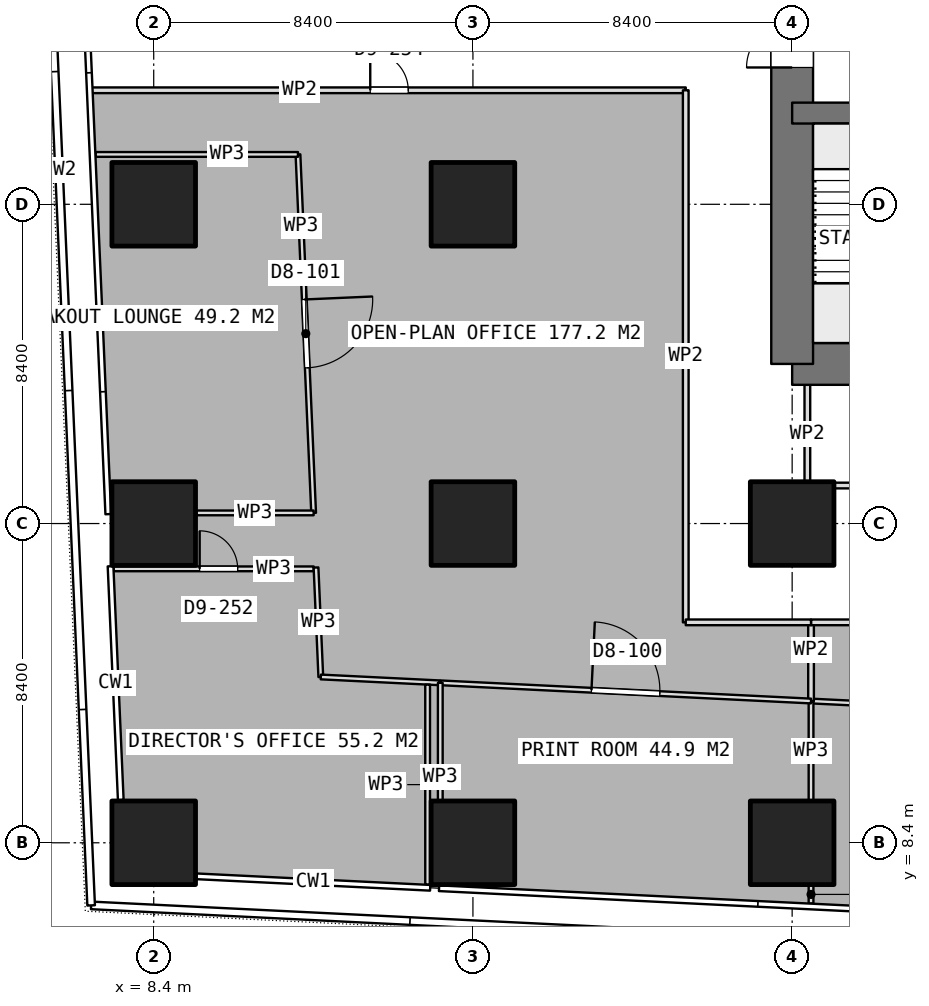
"""IFC4 building model, lengths in metres.
Left out: names, types, materials, properties, quantities, classifications, styles, units other than length and angle.
Written with IfcOpenShell. Run it as: python <this file> out.ifc"""

import sys

from ifc_helpers import new_model, si_unit, direction, frame, frame_2d, origin, origin_2d, place, context, subcontext, project, spatial, rectangle, extrude, element, fill, save


model = new_model("IFC4")
c1 = context("Model", 3, precision=1e-05, world=origin(), true_north=direction((0.0, 1.0)))
c2 = subcontext(c1, "Body", "Model", "MODEL_VIEW")
j1 = project(units=[si_unit("LENGTHUNIT", "METRE"), si_unit("PLANEANGLEUNIT", "RADIAN")], contexts=[c1])
p1 = place(None, origin())
s1 = spatial("IfcSite", under=j1, at=p1, CompositionType="ELEMENT")
p2 = place(p1, origin())
s2 = spatial("IfcBuilding", under=s1, at=p2, CompositionType="ELEMENT")
p3 = place(p2, frame((0.0, 0.0, 74.15)))
s3 = spatial("IfcBuildingStorey", under=s2, at=p3, CompositionType="ELEMENT", Elevation=74.15)
p4 = place(p3, frame((25.2, 21.0, 0.0), z_axis=(0.0, 0.0, 1.0), x_axis=(1.0, 0.0, 0.0)))
e1 = element("IfcWall", 1, at=p4, inside=s3, PredefinedType="SHEAR", context=c2, shape_type="SweptSolid", body=[
    extrude(rectangle(XDim=10.4, YDim=1.1, at=frame_2d((5.2, 0.0))), origin(), (0.0, 0.0, 1.0), 3.75),
])
p5 = place(p3, frame((25.2, 21.0, 0.0), z_axis=(0.0, 0.0, 1.0), x_axis=(0.0, 1.0, 0.0)))
e2 = element("IfcWall", 2, at=p5, inside=s3, PredefinedType="SHEAR", context=c2, shape_type="SweptSolid", body=[
    extrude(rectangle(XDim=25.2, YDim=1.1, at=frame_2d((12.6, 0.0))), origin(), (0.0, 0.0, 1.0), 3.75),
])
p6 = place(p5, frame((7.8, 0.0, 0.0)))
e3 = element("IfcOpeningElement", 3, at=p6, cuts=e2, PredefinedType="OPENING", context=c2, shape_type="SweptSolid", body=[
    extrude(rectangle(XDim=1.2, YDim=2.1, at=frame_2d((0.6, 1.05))), frame((0.0, 0.56, 0.0), z_axis=(0.0, -1.0, 0.0), x_axis=(1.0, 0.0, 0.0)), (0.0, 0.0, 1.0), 1.12),
])
p7 = place(p5, frame((14.25, 0.0, 0.0)))
e4 = element("IfcOpeningElement", 4, at=p7, cuts=e2, PredefinedType="OPENING", context=c2, shape_type="SweptSolid", body=[
    extrude(rectangle(XDim=0.9, YDim=2.1, at=frame_2d((0.45, 1.05))), frame((0.0, 0.56, 0.0), z_axis=(0.0, -1.0, 0.0), x_axis=(1.0, 0.0, 0.0)), (0.0, 0.0, 1.0), 1.12),
])
p8 = place(p5, frame((16.85, 0.0, 0.0)))
e5 = element("IfcOpeningElement", 5, at=p8, cuts=e2, PredefinedType="OPENING", context=c2, shape_type="SweptSolid", body=[
    extrude(rectangle(XDim=0.9, YDim=2.1, at=frame_2d((0.45, 1.05))), frame((0.0, 0.56, 0.0), z_axis=(0.0, -1.0, 0.0), x_axis=(1.0, 0.0, 0.0)), (0.0, 0.0, 1.0), 1.12),
])
p9 = place(p5, frame((19.075, 0.0, 0.0)))
e6 = element("IfcOpeningElement", 6, at=p9, cuts=e2, PredefinedType="OPENING", context=c2, shape_type="SweptSolid", body=[
    extrude(rectangle(XDim=1.2, YDim=2.1, at=frame_2d((0.6, 1.05))), frame((0.0, 0.56, 0.0), z_axis=(0.0, -1.0, 0.0), x_axis=(1.0, 0.0, 0.0)), (0.0, 0.0, 1.0), 1.12),
])
p10 = place(p3, frame((25.2, 27.6, 0.0), z_axis=(0.0, 0.0, 1.0), x_axis=(1.0, 0.0, 0.0)))
e7 = element("IfcWall", 7, at=p10, inside=s3, PredefinedType="SHEAR", context=c2, shape_type="SweptSolid", body=[
    extrude(rectangle(XDim=6.6, YDim=0.55, at=frame_2d((3.3, 0.0))), origin(), (0.0, 0.0, 1.0), 3.75),
])
p11 = place(p10, frame((4.925, 0.0, 0.0)))
e8 = element("IfcOpeningElement", 8, at=p11, cuts=e7, PredefinedType="OPENING", context=c2, shape_type="SweptSolid", body=[
    extrude(rectangle(XDim=1.2, YDim=2.1, at=frame_2d((0.6, 1.05))), frame((0.0, 0.285, 0.0), z_axis=(0.0, -1.0, 0.0), x_axis=(1.0, 0.0, 0.0)), (0.0, 0.0, 1.0), 0.57),
])
for number, where, z_axis, x_axis in (
    (9, (8.4, 8.4, 0.0), (0.0, 0.0, 1.0), (1.0, 0.0, 0.0)),
    (10, (8.4, 16.8, 0.0), (0.0, 0.0, 1.0), (1.0, 0.0, 0.0)),
    (11, (8.4, 25.2, 0.0), (0.0, 0.0, 1.0), (1.0, 0.0, 0.0)),
    (12, (16.8, 8.4, 0.0), (0.0, 0.0, 1.0), (1.0, 0.0, 0.0)),
    (13, (16.8, 16.8, 0.0), (0.0, 0.0, 1.0), (1.0, 0.0, 0.0)),
    (14, (16.8, 25.2, 0.0), (0.0, 0.0, 1.0), (1.0, 0.0, 0.0)),
    (15, (25.2, 8.4, 0.0), (0.0, 0.0, 1.0), (1.0, 0.0, 0.0)),
    (16, (25.2, 16.8, 0.0), (0.0, 0.0, 1.0), (1.0, 0.0, 0.0)),
):
    element("IfcColumn", number, at=place(p3, frame(where, z_axis=z_axis, x_axis=x_axis)), inside=s3, PredefinedType="COLUMN", context=c2, shape_type="SweptSolid", body=[
        extrude(rectangle(XDim=2.2, YDim=2.2, at=origin_2d()), origin(), (0.0, 0.0, 1.0), 3.75),
    ])
p12 = place(p3, frame((25.525, 17.8, 0.0), z_axis=(0.0, 0.0, 1.0), x_axis=(1.0, 0.0, 0.0)))
e17 = element("IfcWall", 17, at=p12, inside=s3, PredefinedType="PARTITIONING", context=c2, shape_type="SweptSolid", body=[
    extrude(rectangle(XDim=9.75, YDim=0.15, at=frame_2d((4.875, 0.0))), origin(), (0.0, 0.0, 1.0), 3.5),
])
p13 = place(p12, frame((4.375, 0.0, 0.0)))
e18 = element("IfcOpeningElement", 18, at=p13, cuts=e17, PredefinedType="OPENING", context=c2, shape_type="SweptSolid", body=[
    extrude(rectangle(XDim=1.0, YDim=2.1, at=frame_2d((0.5, 1.05))), frame((0.0, 0.085, 0.0), z_axis=(0.0, -1.0, 0.0), x_axis=(1.0, 0.0, 0.0)), (0.0, 0.0, 1.0), 0.17),
])
p14 = place(p3, frame((25.6, 17.875, 0.0), z_axis=(0.0, 0.0, 1.0), x_axis=(0.0, 1.0, 0.0)))
e19 = element("IfcWall", 19, at=p14, inside=s3, PredefinedType="PARTITIONING", context=c2, shape_type="SweptSolid", body=[
    extrude(rectangle(XDim=2.575, YDim=0.15, at=frame_2d((1.288, 0.0))), origin(), (0.0, 0.0, 1.0), 3.5),
])
p15 = place(p3, frame((25.697, 12.13, 0.0), z_axis=(0.0, 0.0, 1.0), x_axis=(0.99879453849, -0.049086351277, 0.0)))
e20 = element("IfcWall", 20, at=p15, inside=s3, PredefinedType="PARTITIONING", context=c2, shape_type="SweptSolid", body=[
    extrude(rectangle(XDim=10.614, YDim=0.125, at=frame_2d((5.307, 0.0))), origin(), (0.0, 0.0, 1.0), 3.5),
])
p16 = place(p15, frame((4.407, 0.0, 0.0)))
e21 = element("IfcOpeningElement", 21, at=p16, cuts=e20, PredefinedType="OPENING", context=c2, shape_type="SweptSolid", body=[
    extrude(rectangle(XDim=1.8, YDim=2.1, at=frame_2d((0.9, 1.05))), frame((0.0, 0.073, 0.0), z_axis=(0.0, -1.0, 0.0), x_axis=(1.0, 0.0, 0.0)), (0.0, 0.0, 1.0), 0.145),
])
p17 = place(p3, frame((25.697, 6.803, 0.0), z_axis=(0.0, 0.0, 1.0), x_axis=(0.0, 1.0, 0.0)))
e22 = element("IfcWall", 22, at=p17, inside=s3, PredefinedType="PARTITIONING", context=c2, shape_type="SweptSolid", body=[
    extrude(rectangle(XDim=0.477, YDim=0.125, at=frame_2d((0.239, 0.0))), origin(), (0.0, 0.0, 1.0), 3.5),
])
p18 = place(p3, frame((25.697, 9.52, 0.0), z_axis=(0.0, 0.0, 1.0), x_axis=(0.0, 1.0, 0.0)))
e23 = element("IfcWall", 23, at=p18, inside=s3, PredefinedType="PARTITIONING", context=c2, shape_type="SweptSolid", body=[
    extrude(rectangle(XDim=2.61, YDim=0.125, at=frame_2d((1.305, 0.0))), origin(), (0.0, 0.0, 1.0), 3.5),
])
p19 = place(p3, frame((25.697, 12.13, 0.0), z_axis=(0.0, 0.0, 1.0), x_axis=(0.0, 1.0, 0.0)))
e24 = element("IfcWall", 24, at=p19, inside=s3, PredefinedType="PARTITIONING", context=c2, shape_type="SweptSolid", body=[
    extrude(rectangle(XDim=2.07, YDim=0.15, at=frame_2d((1.035, 0.0))), origin(), (0.0, 0.0, 1.0), 3.5),
])
p20 = place(p3, frame((25.697, 14.2, 0.0), z_axis=(0.0, 0.0, 1.0), x_axis=(1.0, 0.0, 0.0)))
e25 = element("IfcWall", 25, at=p20, inside=s3, PredefinedType="PARTITIONING", context=c2, shape_type="SweptSolid", body=[
    extrude(rectangle(XDim=10.603, YDim=0.15, at=frame_2d((5.302, 0.0))), origin(), (0.0, 0.0, 1.0), 3.5),
])
p21 = place(p3, frame((12.196, 26.512, 0.0), z_axis=(0.0, 0.0, 1.0), x_axis=(0.043625757269, -0.999047943445, 0.0)))
e26 = element("IfcWall", 26, at=p21, inside=s3, PredefinedType="PARTITIONING", context=c2, shape_type="SweptSolid", body=[
    extrude(rectangle(XDim=9.441, YDim=0.125, at=frame_2d((4.72, 0.0))), origin(), (0.0, 0.0, 1.0), 3.5),
])
p22 = place(p21, frame((3.82, 0.0, 0.0)))
e27 = element("IfcOpeningElement", 27, at=p22, cuts=e26, PredefinedType="OPENING", context=c2, shape_type="SweptSolid", body=[
    extrude(rectangle(XDim=1.8, YDim=2.1, at=frame_2d((0.9, 1.05))), frame((0.0, 0.073, 0.0), z_axis=(0.0, -1.0, 0.0), x_axis=(1.0, 0.0, 0.0)), (0.0, 0.0, 1.0), 0.145),
])
p23 = place(p3, frame((12.608, 17.08, 0.0), z_axis=(0.0, 0.0, 1.0), x_axis=(-1.0, 0.0, 0.0)))
e28 = element("IfcWall", 28, at=p23, inside=s3, PredefinedType="PARTITIONING", context=c2, shape_type="SweptSolid", body=[
    extrude(rectangle(XDim=3.088, YDim=0.125, at=frame_2d((1.544, 0.0))), origin(), (0.0, 0.0, 1.0), 3.5),
])
p24 = place(p3, frame((6.871, 26.512, 0.0), z_axis=(0.0, 0.0, 1.0), x_axis=(1.0, 0.0, 0.0)))
e29 = element("IfcWall", 29, at=p24, inside=s3, PredefinedType="PARTITIONING", context=c2, shape_type="SweptSolid", body=[
    extrude(rectangle(XDim=5.325, YDim=0.125, at=frame_2d((2.663, 0.0))), origin(), (0.0, 0.0, 1.0), 3.5),
])
p25 = place(p3, frame((7.347, 15.608, 0.0), z_axis=(0.0, 0.0, 1.0), x_axis=(1.0, 0.0, 0.0)))
e30 = element("IfcWall", 30, at=p25, inside=s3, PredefinedType="PARTITIONING", context=c2, shape_type="SweptSolid", body=[
    extrude(rectangle(XDim=5.263, YDim=0.125, at=frame_2d((2.632, 0.0))), origin(), (0.0, 0.0, 1.0), 3.5),
])
p26 = place(p25, frame((2.262, 0.0, 0.0)))
e31 = element("IfcOpeningElement", 31, at=p26, cuts=e30, PredefinedType="OPENING", context=c2, shape_type="SweptSolid", body=[
    extrude(rectangle(XDim=1.0, YDim=2.1, at=frame_2d((0.5, 1.05))), frame((0.0, 0.073, 0.0), z_axis=(0.0, -1.0, 0.0), x_axis=(1.0, 0.0, 0.0)), (0.0, 0.0, 1.0), 0.145),
])
p27 = place(p3, frame((12.671, 15.643, 0.0), z_axis=(0.0, 0.0, 1.0), x_axis=(0.043782676762, -0.999041078843, 0.0)))
e32 = element("IfcWall", 32, at=p27, inside=s3, PredefinedType="PARTITIONING", context=c2, shape_type="SweptSolid", body=[
    extrude(rectangle(XDim=2.883, YDim=0.125, at=frame_2d((1.441, 0.0))), origin(), (0.0, 0.0, 1.0), 3.5),
])
p28 = place(p3, frame((12.797, 12.763, 0.0), z_axis=(0.0, 0.0, 1.0), x_axis=(0.998790140287, -0.049175762993, 0.0)))
e33 = element("IfcWall", 33, at=p28, inside=s3, PredefinedType="PARTITIONING", context=c2, shape_type="SweptSolid", body=[
    extrude(rectangle(XDim=3.133, YDim=0.125, at=frame_2d((1.566, 0.0))), origin(), (0.0, 0.0, 1.0), 3.5),
])
p29 = place(p3, frame((15.608, 12.562, 0.0), z_axis=(0.0, 0.0, 1.0), x_axis=(0.0, -1.0, 0.0)))
e34 = element("IfcWall", 34, at=p29, inside=s3, PredefinedType="PARTITIONING", context=c2, shape_type="SweptSolid", body=[
    extrude(rectangle(XDim=5.263, YDim=0.125, at=frame_2d((2.631, 0.0))), origin(), (0.0, 0.0, 1.0), 3.5),
])
p30 = place(p3, frame((15.941, 12.609, 0.0), z_axis=(0.0, 0.0, 1.0), x_axis=(0.998796633854, -0.049043696865, 0.0)))
e35 = element("IfcWall", 35, at=p30, inside=s3, PredefinedType="PARTITIONING", context=c2, shape_type="SweptSolid", body=[
    extrude(rectangle(XDim=9.767, YDim=0.125, at=frame_2d((4.883, 0.0))), origin(), (0.0, 0.0, 1.0), 3.5),
])
p31 = place(p30, frame((3.983, 0.0, 0.0)))
e36 = element("IfcOpeningElement", 36, at=p31, cuts=e35, PredefinedType="OPENING", context=c2, shape_type="SweptSolid", body=[
    extrude(rectangle(XDim=1.8, YDim=2.1, at=frame_2d((0.9, 1.05))), frame((0.0, 0.073, 0.0), z_axis=(0.0, -1.0, 0.0), x_axis=(1.0, 0.0, 0.0)), (0.0, 0.0, 1.0), 0.145),
])
p32 = place(p3, frame((15.941, 9.52, 0.0), z_axis=(0.0, 0.0, 1.0), x_axis=(0.0, 1.0, 0.0)))
e37 = element("IfcWall", 37, at=p32, inside=s3, PredefinedType="PARTITIONING", context=c2, shape_type="SweptSolid", body=[
    extrude(rectangle(XDim=3.089, YDim=0.125, at=frame_2d((1.544, 0.0))), origin(), (0.0, 0.0, 1.0), 3.5),
])
p33 = place(p3, frame((6.767, 28.2, 0.0), z_axis=(0.0, 0.0, 1.0), x_axis=(1.0, 0.0, 0.0)))
e38 = element("IfcWall", 38, at=p33, inside=s3, PredefinedType="PARTITIONING", context=c2, shape_type="SweptSolid", body=[
    extrude(rectangle(XDim=15.633, YDim=0.15, at=frame_2d((7.816, 0.0))), origin(), (0.0, 0.0, 1.0), 3.5),
])
p34 = place(p33, frame((7.331, 0.0, 0.0)))
e39 = element("IfcOpeningElement", 39, at=p34, cuts=e38, PredefinedType="OPENING", context=c2, shape_type="SweptSolid", body=[
    extrude(rectangle(XDim=1.0, YDim=2.1, at=frame_2d((0.5, 1.05))), frame((0.0, 0.085, 0.0), z_axis=(0.0, -1.0, 0.0), x_axis=(1.0, 0.0, 0.0)), (0.0, 0.0, 1.0), 0.17),
])
p35 = place(p3, frame((22.4, 28.2, 0.0), z_axis=(0.0, 0.0, 1.0), x_axis=(0.0, -1.0, 0.0)))
e40 = element("IfcWall", 40, at=p35, inside=s3, PredefinedType="PARTITIONING", context=c2, shape_type="SweptSolid", body=[
    extrude(rectangle(XDim=14.0, YDim=0.15, at=frame_2d((7.0, 0.0))), origin(), (0.0, 0.0, 1.0), 3.5),
])
p36 = place(p3, frame((22.4, 14.2, 0.0), z_axis=(0.0, 0.0, 1.0), x_axis=(1.0, 0.0, 0.0)))
e41 = element("IfcWall", 41, at=p36, inside=s3, PredefinedType="PARTITIONING", context=c2, shape_type="SweptSolid", body=[
    extrude(rectangle(XDim=3.296, YDim=0.15, at=frame_2d((1.648, 0.0))), origin(), (0.0, 0.0, 1.0), 3.5),
])
p37 = place(p6, origin())
e42 = element("IfcDoor", 42, at=p37, inside=s3, OperationType="SINGLE_SWING_LEFT", PredefinedType="DOOR", context=c2, shape_type="SweptSolid", body=[
    extrude(rectangle(XDim=1.2, YDim=2.1, at=frame_2d((0.6, 1.05))), frame((0.0, 0.025, 0.0), z_axis=(0.0, -1.0, 0.0), x_axis=(1.0, 0.0, 0.0)), (0.0, 0.0, 1.0), 0.05),
])
fill(e3, e42)
p38 = place(p22, origin())
e43 = element("IfcDoor", 43, at=p38, inside=s3, OperationType="DOUBLE_DOOR_SINGLE_SWING", PredefinedType="DOOR", context=c2, shape_type="SweptSolid", body=[
    extrude(rectangle(XDim=1.8, YDim=2.1, at=frame_2d((0.9, 1.05))), frame((0.0, 0.025, 0.0), z_axis=(0.0, -1.0, 0.0), x_axis=(1.0, 0.0, 0.0)), (0.0, 0.0, 1.0), 0.05),
])
fill(e27, e43)
p39 = place(p26, origin())
e44 = element("IfcDoor", 44, at=p39, inside=s3, OperationType="SINGLE_SWING_LEFT", PredefinedType="DOOR", context=c2, shape_type="SweptSolid", body=[
    extrude(rectangle(XDim=1.0, YDim=2.1, at=frame_2d((0.5, 1.05))), frame((0.0, 0.025, 0.0), z_axis=(0.0, -1.0, 0.0), x_axis=(1.0, 0.0, 0.0)), (0.0, 0.0, 1.0), 0.05),
])
fill(e31, e44)
p40 = place(p31, origin())
e45 = element("IfcDoor", 45, at=p40, inside=s3, OperationType="DOUBLE_DOOR_SINGLE_SWING", PredefinedType="DOOR", context=c2, shape_type="SweptSolid", body=[
    extrude(rectangle(XDim=1.8, YDim=2.1, at=frame_2d((0.9, 1.05))), frame((0.0, 0.025, 0.0), z_axis=(0.0, -1.0, 0.0), x_axis=(1.0, 0.0, 0.0)), (0.0, 0.0, 1.0), 0.05),
])
fill(e36, e45)
p41 = place(p34, origin())
e46 = element("IfcDoor", 46, at=p41, inside=s3, OperationType="SINGLE_SWING_LEFT", PredefinedType="DOOR", context=c2, shape_type="SweptSolid", body=[
    extrude(rectangle(XDim=1.0, YDim=2.1, at=frame_2d((0.5, 1.05))), frame((0.0, 0.025, 0.0), z_axis=(0.0, -1.0, 0.0), x_axis=(1.0, 0.0, 0.0)), (0.0, 0.0, 1.0), 0.05),
])
fill(e39, e46)
save(model, sys.argv[1])
